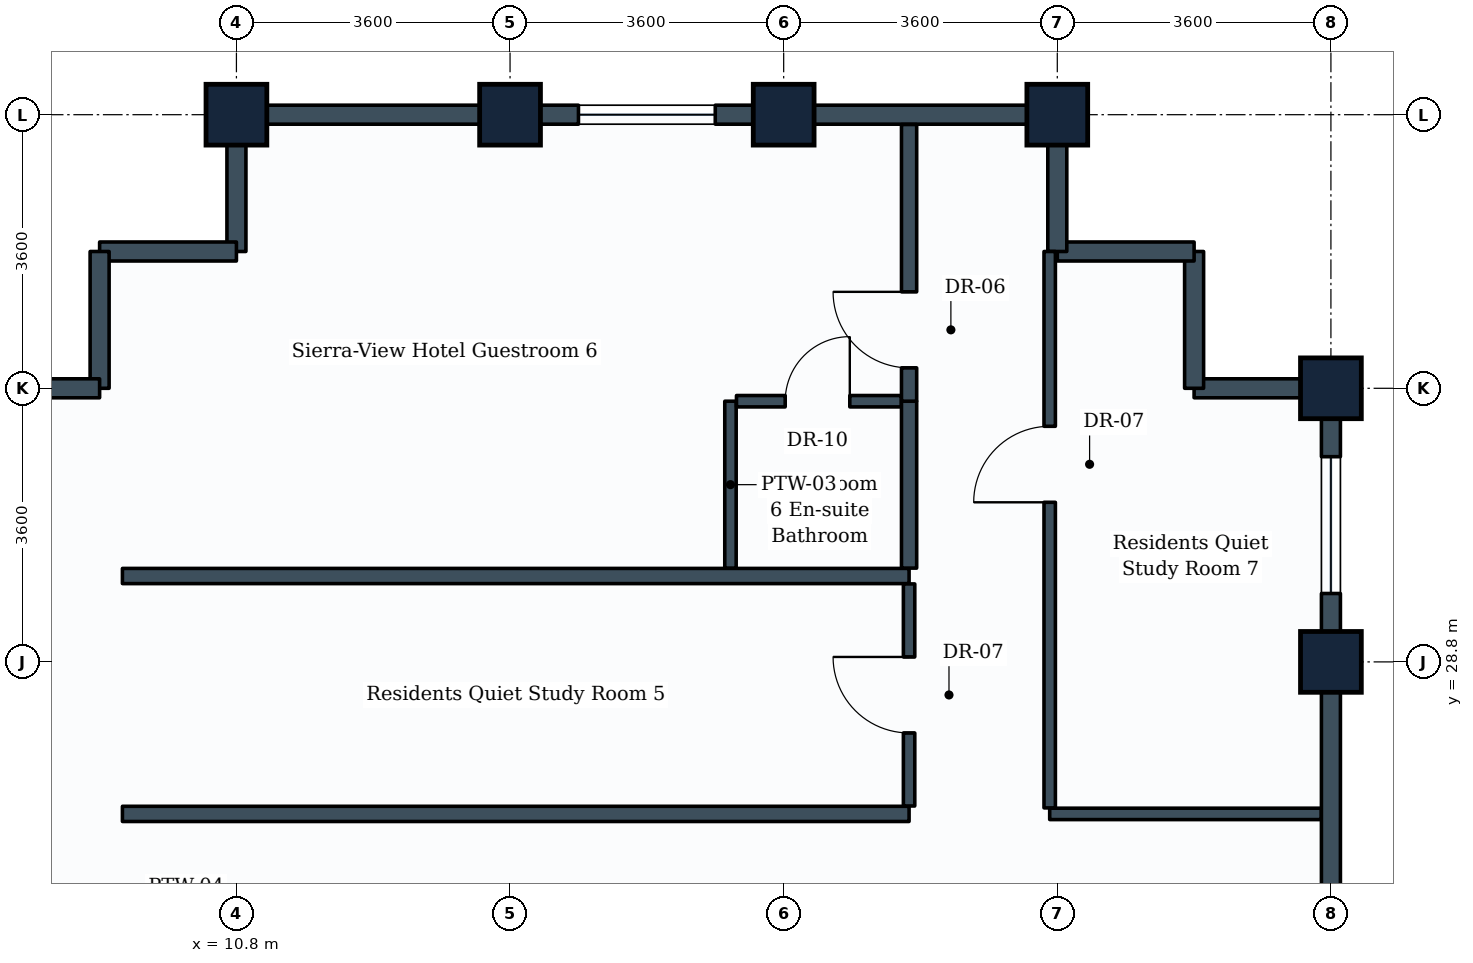
"""IFC4 building model, lengths in metres.
Left out: names, types, materials, properties, quantities, classifications, styles, units other than length and angle.
Written with IfcOpenShell. Run it as: python <this file> out.ifc"""

import sys

from ifc_helpers import new_model, si_unit, direction, frame, frame_2d, origin, origin_2d, place, context, subcontext, project, spatial, rectangle, extrude, element, fill, save


model = new_model("IFC4")
c1 = context("Model", 3, precision=1e-05, world=origin(), true_north=direction((0.0, 1.0)))
c2 = subcontext(c1, "Body", "Model", "MODEL_VIEW")
j1 = project(units=[si_unit("LENGTHUNIT", "METRE"), si_unit("PLANEANGLEUNIT", "RADIAN")], contexts=[c1])
p1 = place(None, origin())
s1 = spatial("IfcSite", under=j1, at=p1, CompositionType="ELEMENT")
p2 = place(p1, origin())
s2 = spatial("IfcBuilding", under=s1, at=p2, CompositionType="ELEMENT")
p3 = place(p2, frame((0.0, 0.0, 228.2)))
s3 = spatial("IfcBuildingStorey", under=s2, at=p3, CompositionType="ELEMENT", Elevation=228.2)
for number, where, z_axis, x_axis in (
    (1, (10.8, 36.0, 0.0), (0.0, 0.0, 1.0), (1.0, 0.0, 0.0)),
    (2, (14.4, 36.0, 0.0), (0.0, 0.0, 1.0), (1.0, 0.0, 0.0)),
    (3, (18.0, 36.0, 0.0), (0.0, 0.0, 1.0), (1.0, 0.0, 0.0)),
    (4, (21.6, 36.0, 0.0), (0.0, 0.0, 1.0), (1.0, 0.0, 0.0)),
    (5, (25.2, 28.8, 0.0), (0.0, 0.0, 1.0), (0.0, 1.0, 0.0)),
    (6, (25.2, 32.4, 0.0), (0.0, 0.0, 1.0), (0.0, 1.0, 0.0)),
):
    element("IfcColumn", number, at=place(p3, frame(where, z_axis=z_axis, x_axis=x_axis)), inside=s3, PredefinedType="COLUMN", context=c2, shape_type="SweptSolid", body=[
        extrude(rectangle(XDim=0.8, YDim=0.8, at=origin_2d()), origin(), (0.0, 0.0, 1.0), 3.6),
    ])
p4 = place(p3, frame((25.2, 28.8, 0.0), z_axis=(0.0, 0.0, 1.0), x_axis=(0.0, -1.0, 0.0)))
e7 = element("IfcWall", 7, at=p4, inside=s3, PredefinedType="STANDARD", context=c2, shape_type="SweptSolid", body=[
    extrude(rectangle(XDim=3.6, YDim=0.25, at=frame_2d((1.8, 0.0))), origin(), (0.0, 0.0, 1.0), 2.83),
])
p5 = place(p3, frame((25.2, 32.4, 0.0), z_axis=(0.0, 0.0, 1.0), x_axis=(0.0, -1.0, 0.0)))
e8 = element("IfcWall", 8, at=p5, inside=s3, PredefinedType="STANDARD", context=c2, shape_type="SweptSolid", body=[
    extrude(rectangle(XDim=3.6, YDim=0.25, at=frame_2d((1.8, 0.0))), origin(), (0.0, 0.0, 1.0), 2.83),
])
p6 = place(p5, frame((0.9, 0.0, 0.85)))
e9 = element("IfcOpeningElement", 9, at=p6, cuts=e8, PredefinedType="OPENING", context=c2, shape_type="SweptSolid", body=[
    extrude(rectangle(XDim=1.8, YDim=1.35, at=frame_2d((0.9, 0.675))), frame((0.0, 0.135, 0.0), z_axis=(0.0, -1.0, 0.0), x_axis=(1.0, 0.0, 0.0)), (0.0, 0.0, 1.0), 0.27),
])
p7 = place(p3, frame((23.4, 32.4, 0.0), z_axis=(0.0, 0.0, 1.0), x_axis=(1.0, 0.0, 0.0)))
e10 = element("IfcWall", 10, at=p7, inside=s3, PredefinedType="STANDARD", context=c2, shape_type="SweptSolid", body=[
    extrude(rectangle(XDim=1.8, YDim=0.25, at=frame_2d((0.9, 0.0))), origin(), (0.0, 0.0, 1.0), 2.83),
])
p8 = place(p3, frame((23.4, 32.4, 0.0), z_axis=(0.0, 0.0, 1.0), x_axis=(0.0, 1.0, 0.0)))
e11 = element("IfcWall", 11, at=p8, inside=s3, PredefinedType="STANDARD", context=c2, shape_type="SweptSolid", body=[
    extrude(rectangle(XDim=1.8, YDim=0.25, at=frame_2d((0.9, 0.0))), origin(), (0.0, 0.0, 1.0), 3.335),
])
p9 = place(p3, frame((21.6, 34.2, 0.0), z_axis=(0.0, 0.0, 1.0), x_axis=(1.0, 0.0, 0.0)))
e12 = element("IfcWall", 12, at=p9, inside=s3, PredefinedType="STANDARD", context=c2, shape_type="SweptSolid", body=[
    extrude(rectangle(XDim=1.8, YDim=0.25, at=frame_2d((0.9, 0.0))), origin(), (0.0, 0.0, 1.0), 3.335),
])
p10 = place(p3, frame((21.6, 34.2, 0.0), z_axis=(0.0, 0.0, 1.0), x_axis=(0.0, 1.0, 0.0)))
e13 = element("IfcWall", 13, at=p10, inside=s3, PredefinedType="STANDARD", context=c2, shape_type="SweptSolid", body=[
    extrude(rectangle(XDim=1.8, YDim=0.25, at=frame_2d((0.9, 0.0))), origin(), (0.0, 0.0, 1.0), 2.83),
])
p11 = place(p3, frame((18.0, 36.0, 0.0), z_axis=(0.0, 0.0, 1.0), x_axis=(1.0, 0.0, 0.0)))
e14 = element("IfcWall", 14, at=p11, inside=s3, PredefinedType="STANDARD", context=c2, shape_type="SweptSolid", body=[
    extrude(rectangle(XDim=3.6, YDim=0.25, at=frame_2d((1.8, 0.0))), origin(), (0.0, 0.0, 1.0), 2.83),
])
p12 = place(p3, frame((14.4, 36.0, 0.0), z_axis=(0.0, 0.0, 1.0), x_axis=(1.0, 0.0, 0.0)))
e15 = element("IfcWall", 15, at=p12, inside=s3, PredefinedType="STANDARD", context=c2, shape_type="SweptSolid", body=[
    extrude(rectangle(XDim=3.6, YDim=0.25, at=frame_2d((1.8, 0.0))), origin(), (0.0, 0.0, 1.0), 2.83),
])
p13 = place(p12, frame((0.9, 0.0, 0.85)))
e16 = element("IfcOpeningElement", 16, at=p13, cuts=e15, PredefinedType="OPENING", context=c2, shape_type="SweptSolid", body=[
    extrude(rectangle(XDim=1.8, YDim=1.35, at=frame_2d((0.9, 0.675))), frame((0.0, 0.135, 0.0), z_axis=(0.0, -1.0, 0.0), x_axis=(1.0, 0.0, 0.0)), (0.0, 0.0, 1.0), 0.27),
])
p14 = place(p3, frame((10.8, 36.0, 0.0), z_axis=(0.0, 0.0, 1.0), x_axis=(1.0, 0.0, 0.0)))
e17 = element("IfcWall", 17, at=p14, inside=s3, PredefinedType="STANDARD", context=c2, shape_type="SweptSolid", body=[
    extrude(rectangle(XDim=3.6, YDim=0.25, at=frame_2d((1.8, 0.0))), origin(), (0.0, 0.0, 1.0), 2.83),
])
p15 = place(p3, frame((10.8, 34.2, 0.0), z_axis=(0.0, 0.0, 1.0), x_axis=(0.0, 1.0, 0.0)))
e18 = element("IfcWall", 18, at=p15, inside=s3, PredefinedType="STANDARD", context=c2, shape_type="SweptSolid", body=[
    extrude(rectangle(XDim=1.8, YDim=0.25, at=frame_2d((0.9, 0.0))), origin(), (0.0, 0.0, 1.0), 2.83),
])
for number, where, z_axis, x_axis in (
    (19, (9.0, 34.2, 0.0), (0.0, 0.0, 1.0), (1.0, 0.0, 0.0)),
    (20, (9.0, 32.4, 0.0), (0.0, 0.0, 1.0), (0.0, 1.0, 0.0)),
):
    element("IfcWall", number, at=place(p3, frame(where, z_axis=z_axis, x_axis=x_axis)), inside=s3, PredefinedType="STANDARD", context=c2, shape_type="SweptSolid", body=[
        extrude(rectangle(XDim=1.8, YDim=0.25, at=frame_2d((0.9, 0.0))), origin(), (0.0, 0.0, 1.0), 3.335),
    ])
p16 = place(p3, frame((7.2, 32.4, 0.0), z_axis=(0.0, 0.0, 1.0), x_axis=(1.0, 0.0, 0.0)))
e21 = element("IfcWall", 21, at=p16, inside=s3, PredefinedType="STANDARD", context=c2, shape_type="SweptSolid", body=[
    extrude(rectangle(XDim=1.8, YDim=0.25, at=frame_2d((0.9, 0.0))), origin(), (0.0, 0.0, 1.0), 2.83),
])
for number, where, z_axis, x_axis in (
    (22, (9.3, 26.8, 0.0), (0.0, 0.0, 1.0), (1.0, 0.0, 0.0)),
    (23, (9.3, 29.93, 0.0), (0.0, 0.0, 1.0), (1.0, 0.0, 0.0)),
):
    element("IfcWall", number, at=place(p3, frame(where, z_axis=z_axis, x_axis=x_axis)), inside=s3, PredefinedType="PARTITIONING", context=c2, shape_type="SweptSolid", body=[
        extrude(rectangle(XDim=10.35, YDim=0.2, at=frame_2d((5.175, 0.0))), origin(), (0.0, 0.0, 1.0), 3.03),
    ])
p17 = place(p3, frame((19.65, 26.904, 0.0), z_axis=(0.0, 0.0, 1.0), x_axis=(0.0, 1.0, 0.0)))
e24 = element("IfcWall", 24, at=p17, inside=s3, PredefinedType="PARTITIONING", context=c2, shape_type="SweptSolid", body=[
    extrude(rectangle(XDim=2.922, YDim=0.15, at=frame_2d((1.461, 0.0))), origin(), (0.0, 0.0, 1.0), 3.03),
])
p18 = place(p17, frame((0.961, 0.0, 0.0)))
e25 = element("IfcOpeningElement", 25, at=p18, cuts=e24, PredefinedType="OPENING", context=c2, shape_type="SweptSolid", body=[
    extrude(rectangle(XDim=1.0, YDim=2.1, at=frame_2d((0.5, 1.05))), frame((0.0, 0.085, 0.0), z_axis=(0.0, -1.0, 0.0), x_axis=(1.0, 0.0, 0.0)), (0.0, 0.0, 1.0), 0.17),
])
p19 = place(p3, frame((19.65, 30.034, 0.0), z_axis=(0.0, 0.0, 1.0), x_axis=(0.0, 1.0, 0.0)))
e26 = element("IfcWall", 26, at=p19, inside=s3, PredefinedType="PARTITIONING", context=c2, shape_type="SweptSolid", body=[
    extrude(rectangle(XDim=2.196, YDim=0.2, at=frame_2d((1.098, 0.0))), origin(), (0.0, 0.0, 1.0), 3.335),
])
p20 = place(p3, frame((19.65, 32.23, 0.0), z_axis=(0.0, 0.0, 1.0), x_axis=(0.0, 1.0, 0.0)))
e27 = element("IfcWall", 27, at=p20, inside=s3, PredefinedType="PARTITIONING", context=c2, shape_type="SweptSolid", body=[
    extrude(rectangle(XDim=3.641, YDim=0.2, at=frame_2d((1.821, 0.0))), origin(), (0.0, 0.0, 1.0), 2.83),
])
p21 = place(p20, frame((0.439, 0.0, 0.0)))
e28 = element("IfcOpeningElement", 28, at=p21, cuts=e27, PredefinedType="OPENING", context=c2, shape_type="SweptSolid", body=[
    extrude(rectangle(XDim=1.0, YDim=2.1, at=frame_2d((0.5, 1.05))), frame((0.0, 0.11, 0.0), z_axis=(0.0, -1.0, 0.0), x_axis=(1.0, 0.0, 0.0)), (0.0, 0.0, 1.0), 0.22),
])
p22 = place(p3, frame((17.3, 30.034, 0.0), z_axis=(0.0, 0.0, 1.0), x_axis=(0.0, 1.0, 0.0)))
e29 = element("IfcWall", 29, at=p22, inside=s3, PredefinedType="PARTITIONING", context=c2, shape_type="SweptSolid", body=[
    extrude(rectangle(XDim=2.196, YDim=0.15, at=frame_2d((1.098, 0.0))), origin(), (0.0, 0.0, 1.0), 3.335),
])
p23 = place(p3, frame((17.379, 32.23, 0.0), z_axis=(0.0, 0.0, 1.0), x_axis=(1.0, 0.0, 0.0)))
e30 = element("IfcWall", 30, at=p23, inside=s3, PredefinedType="PARTITIONING", context=c2, shape_type="SweptSolid", body=[
    extrude(rectangle(XDim=2.167, YDim=0.15, at=frame_2d((1.083, 0.0))), origin(), (0.0, 0.0, 1.0), 3.03),
])
p24 = place(p23, frame((0.641, 0.0, 0.0)))
e31 = element("IfcOpeningElement", 31, at=p24, cuts=e30, PredefinedType="OPENING", context=c2, shape_type="SweptSolid", body=[
    extrude(rectangle(XDim=0.85, YDim=2.1, at=frame_2d((0.425, 1.05))), frame((0.0, 0.085, 0.0), z_axis=(0.0, -1.0, 0.0), x_axis=(1.0, 0.0, 0.0)), (0.0, 0.0, 1.0), 0.17),
])
p25 = place(p3, frame((21.5, 26.8, 0.0), z_axis=(0.0, 0.0, 1.0), x_axis=(1.0, 0.0, 0.0)))
e32 = element("IfcWall", 32, at=p25, inside=s3, PredefinedType="PARTITIONING", context=c2, shape_type="SweptSolid", body=[
    extrude(rectangle(XDim=3.571, YDim=0.15, at=frame_2d((1.786, 0.0))), origin(), (0.0, 0.0, 1.0), 2.83),
])
p26 = place(p3, frame((21.5, 26.879, 0.0), z_axis=(0.0, 0.0, 1.0), x_axis=(0.0, 1.0, 0.0)))
e33 = element("IfcWall", 33, at=p26, inside=s3, PredefinedType="PARTITIONING", context=c2, shape_type="SweptSolid", body=[
    extrude(rectangle(XDim=7.321, YDim=0.15, at=frame_2d((3.661, 0.0))), origin(), (0.0, 0.0, 1.0), 3.03),
])
p27 = place(p26, frame((4.021, 0.0, 0.0)))
e34 = element("IfcOpeningElement", 34, at=p27, cuts=e33, PredefinedType="OPENING", context=c2, shape_type="SweptSolid", body=[
    extrude(rectangle(XDim=1.0, YDim=2.1, at=frame_2d((0.5, 1.05))), frame((0.0, 0.085, 0.0), z_axis=(0.0, -1.0, 0.0), x_axis=(1.0, 0.0, 0.0)), (0.0, 0.0, 1.0), 0.17),
])
p28 = place(p6, origin())
e35 = element("IfcWindow", 35, at=p28, inside=s3, PartitioningType="SINGLE_PANEL", PredefinedType="WINDOW", context=c2, shape_type="SweptSolid", body=[
    extrude(rectangle(XDim=1.8, YDim=1.35, at=frame_2d((0.9, 0.675))), frame((0.0, 0.03, 0.0), z_axis=(0.0, -1.0, 0.0), x_axis=(1.0, 0.0, 0.0)), (0.0, 0.0, 1.0), 0.06),
])
fill(e9, e35)
p29 = place(p13, origin())
e36 = element("IfcWindow", 36, at=p29, inside=s3, PartitioningType="SINGLE_PANEL", PredefinedType="WINDOW", context=c2, shape_type="SweptSolid", body=[
    extrude(rectangle(XDim=1.8, YDim=1.35, at=frame_2d((0.9, 0.675))), frame((0.0, 0.03, 0.0), z_axis=(0.0, -1.0, 0.0), x_axis=(1.0, 0.0, 0.0)), (0.0, 0.0, 1.0), 0.06),
])
fill(e16, e36)
p30 = place(p18, origin())
e37 = element("IfcDoor", 37, at=p30, inside=s3, OperationType="SINGLE_SWING_RIGHT", PredefinedType="DOOR", context=c2, shape_type="SweptSolid", body=[
    extrude(rectangle(XDim=1.0, YDim=2.1, at=frame_2d((0.5, 1.05))), frame((0.0, 0.025, 0.0), z_axis=(0.0, -1.0, 0.0), x_axis=(1.0, 0.0, 0.0)), (0.0, 0.0, 1.0), 0.05),
])
fill(e25, e37)
p31 = place(p21, origin())
e38 = element("IfcDoor", 38, at=p31, inside=s3, OperationType="SINGLE_SWING_RIGHT", PredefinedType="DOOR", context=c2, shape_type="SweptSolid", body=[
    extrude(rectangle(XDim=1.0, YDim=2.1, at=frame_2d((0.5, 1.05))), frame((0.0, 0.025, 0.0), z_axis=(0.0, -1.0, 0.0), x_axis=(1.0, 0.0, 0.0)), (0.0, 0.0, 1.0), 0.05),
])
fill(e28, e38)
p32 = place(p24, origin())
e39 = element("IfcDoor", 39, at=p32, inside=s3, OperationType="SINGLE_SWING_RIGHT", PredefinedType="DOOR", context=c2, shape_type="SweptSolid", body=[
    extrude(rectangle(XDim=0.85, YDim=2.1, at=frame_2d((0.425, 1.05))), frame((0.0, 0.025, 0.0), z_axis=(0.0, -1.0, 0.0), x_axis=(1.0, 0.0, 0.0)), (0.0, 0.0, 1.0), 0.05),
])
fill(e31, e39)
p33 = place(p27, origin())
e40 = element("IfcDoor", 40, at=p33, inside=s3, OperationType="SINGLE_SWING_LEFT", PredefinedType="DOOR", context=c2, shape_type="SweptSolid", body=[
    extrude(rectangle(XDim=1.0, YDim=2.1, at=frame_2d((0.5, 1.05))), frame((0.0, 0.025, 0.0), z_axis=(0.0, -1.0, 0.0), x_axis=(1.0, 0.0, 0.0)), (0.0, 0.0, 1.0), 0.05),
])
fill(e34, e40)
save(model, sys.argv[1])
